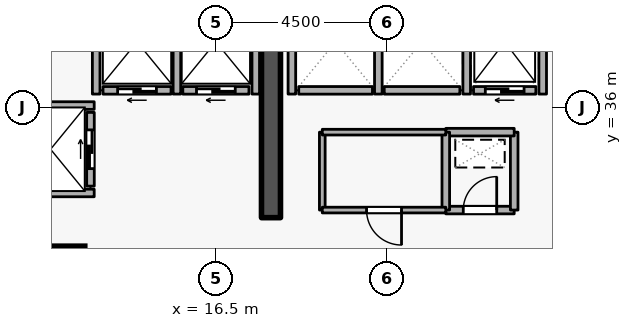
"""IFC4 building model, lengths in metres.
Left out: names, types, materials, properties, quantities, classifications, styles, units other than length and angle.
Written with IfcOpenShell. Run it as: python <this file> out.ifc"""

import sys

from ifc_helpers import new_model, si_unit, direction, frame, frame_2d, origin, origin_2d, place, context, subcontext, project, spatial, rectangle, extrude, element, fill, save


model = new_model("IFC4")
c1 = context("Model", 3, precision=1e-05, world=origin(), true_north=direction((0.0, 1.0)))
c2 = subcontext(c1, "Body", "Model", "MODEL_VIEW")
j1 = project(units=[si_unit("LENGTHUNIT", "METRE"), si_unit("PLANEANGLEUNIT", "RADIAN")], contexts=[c1])
p1 = place(None, origin())
s1 = spatial("IfcSite", under=j1, at=p1, CompositionType="ELEMENT")
p2 = place(p1, origin())
s2 = spatial("IfcBuilding", under=s1, at=p2, CompositionType="ELEMENT")
p3 = place(p2, frame((0.0, 0.0, 167.1)))
s3 = spatial("IfcBuildingStorey", under=s2, at=p3, CompositionType="ELEMENT", Elevation=167.1)
p4 = place(p3, frame((17.95, 33.1, 0.0), z_axis=(0.0, 0.0, 1.0), x_axis=(0.0, 1.0, 0.0)))
e1 = element("IfcWall", 1, at=p4, inside=s3, PredefinedType="SHEAR", context=c2, shape_type="SweptSolid", body=[
    extrude(rectangle(XDim=5.8, YDim=0.5, at=frame_2d((2.9, 0.0))), origin(), (0.0, 0.0, 1.0), 3.6),
])
p5 = place(p3, frame((12.5, 31.8, 0.0), z_axis=(0.0, 0.0, 1.0), x_axis=(1.0, 0.0, 0.0)))
e2 = element("IfcColumn", 2, at=p5, inside=s3, PredefinedType="COLUMN", context=c2, shape_type="SweptSolid", body=[
    extrude(rectangle(XDim=1.1, YDim=1.1, at=origin_2d()), origin(), (0.0, 0.0, 1.0), 3.6),
])
p6 = place(p3, frame((24.92, 36.45, 0.0), z_axis=(0.0, 0.0, 1.0), x_axis=(-1.0, 0.0, 0.0)))
e3 = element("IfcWall", 3, at=p6, inside=s3, PredefinedType="STANDARD", context=c2, shape_type="SweptSolid", body=[
    extrude(rectangle(XDim=1.64, YDim=0.2, at=frame_2d((0.82, 0.0))), origin(), (0.0, 0.0, 1.0), 3.34),
])
p7 = place(p6, frame((0.31, 0.0, 0.0)))
e4 = element("IfcOpeningElement", 4, at=p7, cuts=e3, PredefinedType="OPENING", context=c2, shape_type="SweptSolid", body=[
    extrude(rectangle(XDim=1.02, YDim=2.06, at=frame_2d((0.51, 1.03))), frame((0.0, 0.11, 0.0), z_axis=(0.0, -1.0, 0.0), x_axis=(1.0, 0.0, 0.0)), (0.0, 0.0, 1.0), 0.22),
])
p8 = place(p3, frame((22.92, 36.45, 0.0), z_axis=(0.0, 0.0, 1.0), x_axis=(-1.0, 0.0, 0.0)))
e5 = element("IfcWall", 5, at=p8, inside=s3, PredefinedType="STANDARD", context=c2, shape_type="SweptSolid", body=[
    extrude(rectangle(XDim=1.99, YDim=0.2, at=frame_2d((0.995, 0.0))), origin(), (0.0, 0.0, 1.0), 3.34),
])
p9 = place(p3, frame((20.62, 36.45, 0.0), z_axis=(0.0, 0.0, 1.0), x_axis=(-1.0, 0.0, 0.0)))
e6 = element("IfcWall", 6, at=p9, inside=s3, PredefinedType="STANDARD", context=c2, shape_type="SweptSolid", body=[
    extrude(rectangle(XDim=1.94, YDim=0.2, at=frame_2d((0.97, 0.0))), origin(), (0.0, 0.0, 1.0), 3.34),
])
p10 = place(p3, frame((17.37, 36.45, 0.0), z_axis=(0.0, 0.0, 1.0), x_axis=(-1.0, 0.0, 0.0)))
e7 = element("IfcWall", 7, at=p10, inside=s3, PredefinedType="STANDARD", context=c2, shape_type="SweptSolid", body=[
    extrude(rectangle(XDim=1.74, YDim=0.2, at=frame_2d((0.87, 0.0))), origin(), (0.0, 0.0, 1.0), 3.34),
])
p11 = place(p10, frame((0.36, 0.0, 0.0)))
e8 = element("IfcOpeningElement", 8, at=p11, cuts=e7, PredefinedType="OPENING", context=c2, shape_type="SweptSolid", body=[
    extrude(rectangle(XDim=1.02, YDim=2.06, at=frame_2d((0.51, 1.03))), frame((0.0, 0.11, 0.0), z_axis=(0.0, -1.0, 0.0), x_axis=(1.0, 0.0, 0.0)), (0.0, 0.0, 1.0), 0.22),
])
p12 = place(p3, frame((15.32, 36.45, 0.0), z_axis=(0.0, 0.0, 1.0), x_axis=(-1.0, 0.0, 0.0)))
e9 = element("IfcWall", 9, at=p12, inside=s3, PredefinedType="STANDARD", context=c2, shape_type="SweptSolid", body=[
    extrude(rectangle(XDim=1.79, YDim=0.2, at=frame_2d((0.895, 0.0))), origin(), (0.0, 0.0, 1.0), 3.34),
])
p13 = place(p12, frame((0.385, 0.0, 0.0)))
e10 = element("IfcOpeningElement", 10, at=p13, cuts=e9, PredefinedType="OPENING", context=c2, shape_type="SweptSolid", body=[
    extrude(rectangle(XDim=1.02, YDim=2.06, at=frame_2d((0.51, 1.03))), frame((0.0, 0.11, 0.0), z_axis=(0.0, -1.0, 0.0), x_axis=(1.0, 0.0, 0.0)), (0.0, 0.0, 1.0), 0.22),
])
p14 = place(p3, frame((13.2, 33.93, 0.0), z_axis=(0.0, 0.0, 1.0), x_axis=(0.0, 1.0, 0.0)))
e11 = element("IfcWall", 11, at=p14, inside=s3, PredefinedType="STANDARD", context=c2, shape_type="SweptSolid", body=[
    extrude(rectangle(XDim=1.94, YDim=0.2, at=frame_2d((0.97, 0.0))), origin(), (0.0, 0.0, 1.0), 3.34),
])
p15 = place(p14, frame((0.46, 0.0, 0.0)))
e12 = element("IfcOpeningElement", 12, at=p15, cuts=e11, PredefinedType="OPENING", context=c2, shape_type="SweptSolid", body=[
    extrude(rectangle(XDim=1.02, YDim=2.06, at=frame_2d((0.51, 1.03))), frame((0.0, 0.11, 0.0), z_axis=(0.0, -1.0, 0.0), x_axis=(1.0, 0.0, 0.0)), (0.0, 0.0, 1.0), 0.22),
])
for number, where, z_axis, x_axis in (
    (13, (25.1, 36.352, 0.0), (0.0, 0.0, 1.0), (0.0, 1.0, 0.0)),
    (14, (23.1, 36.352, 0.0), (0.0, 0.0, 1.0), (0.0, 1.0, 0.0)),
    (15, (20.775, 36.352, 0.0), (0.0, 0.0, 1.0), (0.0, 1.0, 0.0)),
    (16, (18.5, 36.352, 0.0), (0.0, 0.0, 1.0), (0.0, 1.0, 0.0)),
):
    element("IfcWall", number, at=place(p3, frame(where, z_axis=z_axis, x_axis=x_axis)), inside=s3, PredefinedType="STANDARD", context=c2, shape_type="SweptSolid", body=[
        extrude(rectangle(XDim=2.536, YDim=0.2, at=frame_2d((1.268, 0.0))), origin(), (0.0, 0.0, 1.0), 3.34),
    ])
p16 = place(p3, frame((17.55, 36.352, 0.0), z_axis=(0.0, 0.0, 1.0), x_axis=(0.0, 1.0, 0.0)))
e17 = element("IfcWall", 17, at=p16, inside=s3, PredefinedType="STANDARD", context=c2, shape_type="SweptSolid", body=[
    extrude(rectangle(XDim=2.636, YDim=0.2, at=frame_2d((1.318, 0.0))), origin(), (0.0, 0.0, 1.0), 2.545),
])
for number, where, z_axis, x_axis in (
    (18, (15.475, 36.352, 0.0), (0.0, 0.0, 1.0), (0.0, 1.0, 0.0)),
    (19, (13.35, 36.352, 0.0), (0.0, 0.0, 1.0), (0.0, 1.0, 0.0)),
):
    element("IfcWall", number, at=place(p3, frame(where, z_axis=z_axis, x_axis=x_axis)), inside=s3, PredefinedType="STANDARD", context=c2, shape_type="SweptSolid", body=[
        extrude(rectangle(XDim=2.636, YDim=0.2, at=frame_2d((1.318, 0.0))), origin(), (0.0, 0.0, 1.0), 3.34),
    ])
for number, where, z_axis, x_axis in (
    (20, (11.002, 36.05, 0.0), (0.0, 0.0, 1.0), (1.0, 0.0, 0.0)),
    (21, (11.002, 33.75, 0.0), (0.0, 0.0, 1.0), (1.0, 0.0, 0.0)),
):
    element("IfcWall", number, at=place(p3, frame(where, z_axis=z_axis, x_axis=x_axis)), inside=s3, PredefinedType="STANDARD", context=c2, shape_type="SweptSolid", body=[
        extrude(rectangle(XDim=2.296, YDim=0.2, at=frame_2d((1.148, 0.0))), origin(), (0.0, 0.0, 1.0), 3.34),
    ])
p17 = place(p3, frame((22.55, 33.3, 0.0), z_axis=(0.0, 0.0, 1.0), x_axis=(1.0, 0.0, 0.0)))
e22 = element("IfcWall", 22, at=p17, inside=s3, PredefinedType="STANDARD", context=c2, shape_type="SweptSolid", body=[
    extrude(rectangle(XDim=1.8, YDim=0.2, at=frame_2d((0.9, 0.0))), origin(), (0.0, 0.0, 1.0), 3.34),
])
p18 = place(p17, frame((0.46, 0.0, 0.0)))
e23 = element("IfcOpeningElement", 23, at=p18, cuts=e22, PredefinedType="OPENING", context=c2, shape_type="SweptSolid", body=[
    extrude(rectangle(XDim=0.88, YDim=2.04, at=frame_2d((0.44, 1.02))), frame((0.0, 0.11, 0.0), z_axis=(0.0, -1.0, 0.0), x_axis=(1.0, 0.0, 0.0)), (0.0, 0.0, 1.0), 0.22),
])
p19 = place(p3, frame((24.35, 33.3, 0.0), z_axis=(0.0, 0.0, 1.0), x_axis=(0.0, 1.0, 0.0)))
e24 = element("IfcWall", 24, at=p19, inside=s3, PredefinedType="STANDARD", context=c2, shape_type="SweptSolid", body=[
    extrude(rectangle(XDim=2.05, YDim=0.2, at=frame_2d((1.025, 0.0))), origin(), (0.0, 0.0, 1.0), 3.34),
])
p20 = place(p3, frame((24.35, 35.35, 0.0), z_axis=(0.0, 0.0, 1.0), x_axis=(-1.0, 0.0, 0.0)))
e25 = element("IfcWall", 25, at=p20, inside=s3, PredefinedType="STANDARD", context=c2, shape_type="SweptSolid", body=[
    extrude(rectangle(XDim=1.8, YDim=0.2, at=frame_2d((0.9, 0.0))), origin(), (0.0, 0.0, 1.0), 3.34),
])
p21 = place(p3, frame((22.55, 35.35, 0.0), z_axis=(0.0, 0.0, 1.0), x_axis=(0.0, -1.0, 0.0)))
e26 = element("IfcWall", 26, at=p21, inside=s3, PredefinedType="STANDARD", context=c2, shape_type="SweptSolid", body=[
    extrude(rectangle(XDim=2.05, YDim=0.2, at=frame_2d((1.025, 0.0))), origin(), (0.0, 0.0, 1.0), 3.34),
])
p22 = place(p3, frame((19.3, 33.3, 0.0), z_axis=(0.0, 0.0, 1.0), x_axis=(0.0, 1.0, 0.0)))
e27 = element("IfcWall", 27, at=p22, inside=s3, PredefinedType="PARTITIONING", context=c2, shape_type="SweptSolid", body=[
    extrude(rectangle(XDim=2.05, YDim=0.15, at=frame_2d((1.025, 0.0))), origin(), (0.0, 0.0, 1.0), 3.34),
])
p23 = place(p3, frame((19.3, 35.35, 0.0), z_axis=(0.0, 0.0, 1.0), x_axis=(1.0, 0.0, 0.0)))
e28 = element("IfcWall", 28, at=p23, inside=s3, PredefinedType="PARTITIONING", context=c2, shape_type="SweptSolid", body=[
    extrude(rectangle(XDim=3.25, YDim=0.15, at=frame_2d((1.625, 0.0))), origin(), (0.0, 0.0, 1.0), 3.34),
])
p24 = place(p3, frame((22.55, 33.3, 0.0), z_axis=(0.0, 0.0, 1.0), x_axis=(-1.0, 0.0, 0.0)))
e29 = element("IfcWall", 29, at=p24, inside=s3, PredefinedType="PARTITIONING", context=c2, shape_type="SweptSolid", body=[
    extrude(rectangle(XDim=3.25, YDim=0.15, at=frame_2d((1.625, 0.0))), origin(), (0.0, 0.0, 1.0), 3.34),
])
p25 = place(p24, frame((1.165, 0.0, 0.0)))
e30 = element("IfcOpeningElement", 30, at=p25, cuts=e29, PredefinedType="OPENING", context=c2, shape_type="SweptSolid", body=[
    extrude(rectangle(XDim=0.92, YDim=2.08, at=frame_2d((0.46, 1.04))), frame((0.0, 0.085, 0.0), z_axis=(0.0, -1.0, 0.0), x_axis=(1.0, 0.0, 0.0)), (0.0, 0.0, 1.0), 0.17),
])
p26 = place(p7, origin())
e31 = element("IfcDoor", 31, at=p26, inside=s3, OperationType="SLIDING_TO_LEFT", PredefinedType="DOOR", context=c2, shape_type="SweptSolid", body=[
    extrude(rectangle(XDim=1.02, YDim=2.06, at=frame_2d((0.51, 1.03))), frame((0.0, 0.025, 0.0), z_axis=(0.0, -1.0, 0.0), x_axis=(1.0, 0.0, 0.0)), (0.0, 0.0, 1.0), 0.05),
])
fill(e4, e31)
p27 = place(p11, origin())
e32 = element("IfcDoor", 32, at=p27, inside=s3, OperationType="SLIDING_TO_LEFT", PredefinedType="DOOR", context=c2, shape_type="SweptSolid", body=[
    extrude(rectangle(XDim=1.02, YDim=2.06, at=frame_2d((0.51, 1.03))), frame((0.0, 0.025, 0.0), z_axis=(0.0, -1.0, 0.0), x_axis=(1.0, 0.0, 0.0)), (0.0, 0.0, 1.0), 0.05),
])
fill(e8, e32)
p28 = place(p13, origin())
e33 = element("IfcDoor", 33, at=p28, inside=s3, OperationType="SLIDING_TO_LEFT", PredefinedType="DOOR", context=c2, shape_type="SweptSolid", body=[
    extrude(rectangle(XDim=1.02, YDim=2.06, at=frame_2d((0.51, 1.03))), frame((0.0, 0.025, 0.0), z_axis=(0.0, -1.0, 0.0), x_axis=(1.0, 0.0, 0.0)), (0.0, 0.0, 1.0), 0.05),
])
fill(e10, e33)
p29 = place(p15, origin())
e34 = element("IfcDoor", 34, at=p29, inside=s3, OperationType="SLIDING_TO_LEFT", PredefinedType="DOOR", context=c2, shape_type="SweptSolid", body=[
    extrude(rectangle(XDim=1.02, YDim=2.06, at=frame_2d((0.51, 1.03))), frame((0.0, 0.025, 0.0), z_axis=(0.0, -1.0, 0.0), x_axis=(1.0, 0.0, 0.0)), (0.0, 0.0, 1.0), 0.05),
])
fill(e12, e34)
p30 = place(p18, origin())
e35 = element("IfcDoor", 35, at=p30, inside=s3, OperationType="SINGLE_SWING_RIGHT", PredefinedType="DOOR", context=c2, shape_type="SweptSolid", body=[
    extrude(rectangle(XDim=0.88, YDim=2.04, at=frame_2d((0.44, 1.02))), frame((0.0, 0.025, 0.0), z_axis=(0.0, -1.0, 0.0), x_axis=(1.0, 0.0, 0.0)), (0.0, 0.0, 1.0), 0.05),
])
fill(e23, e35)
p31 = place(p25, origin())
e36 = element("IfcDoor", 36, at=p31, inside=s3, OperationType="SINGLE_SWING_LEFT", PredefinedType="DOOR", context=c2, shape_type="SweptSolid", body=[
    extrude(rectangle(XDim=0.92, YDim=2.08, at=frame_2d((0.46, 1.04))), frame((0.0, 0.025, 0.0), z_axis=(0.0, -1.0, 0.0), x_axis=(1.0, 0.0, 0.0)), (0.0, 0.0, 1.0), 0.05),
])
fill(e30, e36)
save(model, sys.argv[1])
